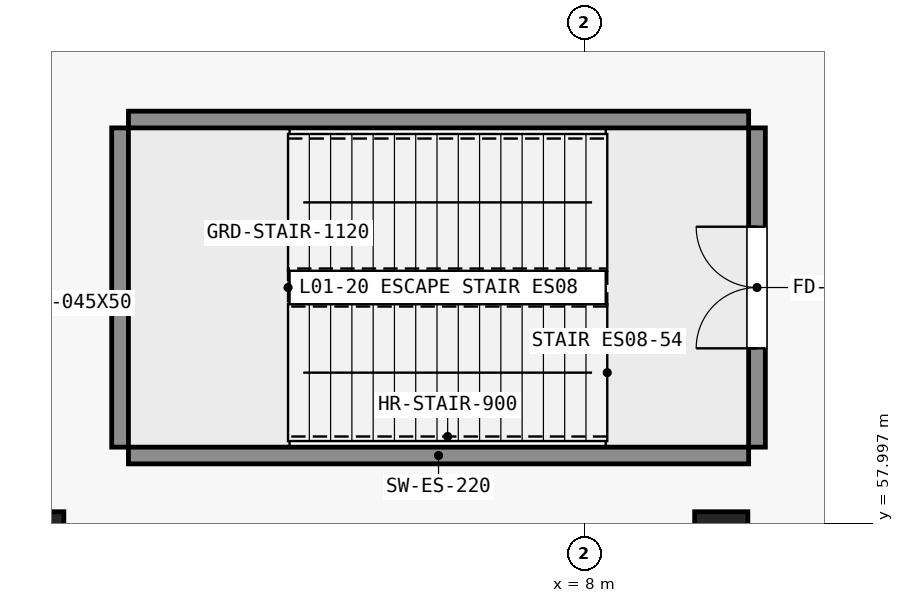
"""IFC4 building model, lengths in metres.
Left out: names, types, materials, properties, quantities, classifications, styles, units other than length and angle.
Written with IfcOpenShell. Run it as: python <this file> out.ifc"""

import sys

from ifc_helpers import new_model, si_unit, direction, frame, frame_2d, origin, origin_2d, place, context, subcontext, project, spatial, rectangle, extrude, element, fill, save


model = new_model("IFC4")
c1 = context("Model", 3, precision=1e-05, world=origin(), true_north=direction((0.0, 1.0)))
c2 = subcontext(c1, "Body", "Model", "MODEL_VIEW")
j1 = project(units=[si_unit("LENGTHUNIT", "METRE"), si_unit("PLANEANGLEUNIT", "RADIAN")], contexts=[c1])
p1 = place(None, origin())
s1 = spatial("IfcSite", under=j1, at=p1, CompositionType="ELEMENT")
p2 = place(p1, origin())
s2 = spatial("IfcBuilding", under=s1, at=p2, CompositionType="ELEMENT")
p3 = place(p2, frame((0.0, 0.0, 6.0)))
s3 = spatial("IfcBuildingStorey", under=s2, at=p3, CompositionType="ELEMENT", Elevation=6.0)
for number, where, z_axis, x_axis in (
    (1, (0.8, 57.8, 0.0), (0.0, 0.0, 1.0), (1.0, 0.0, 0.0)),
    (2, (9.8, 57.8, 0.0), (0.0, 0.0, 1.0), (1.0, 0.0, 0.0)),
):
    element("IfcColumn", number, at=place(p3, frame(where, z_axis=z_axis, x_axis=x_axis)), inside=s3, PredefinedType="COLUMN", context=c2, shape_type="SweptSolid", body=[
        extrude(rectangle(XDim=0.7, YDim=0.7, at=origin_2d()), origin(), (0.0, 0.0, 1.0), 5.4),
    ])
for number, where, z_axis, x_axis in (
    (3, (2.0, 58.89, 0.0), (0.0, 0.0, 1.0), (1.0, 0.0, 0.0)),
    (4, (2.0, 63.31, 0.0), (0.0, 0.0, 1.0), (1.0, 0.0, 0.0)),
):
    element("IfcWall", number, at=place(p3, frame(where, z_axis=z_axis, x_axis=x_axis)), inside=s3, PredefinedType="SHEAR", context=c2, shape_type="SweptSolid", body=[
        extrude(rectangle(XDim=8.16, YDim=0.22, at=frame_2d((4.08, 0.0))), origin(), (0.0, 0.0, 1.0), 5.4),
    ])
p4 = place(p3, frame((1.89, 59.0, 0.0), z_axis=(0.0, 0.0, 1.0), x_axis=(0.0, 1.0, 0.0)))
e5 = element("IfcWall", 5, at=p4, inside=s3, PredefinedType="SHEAR", context=c2, shape_type="SweptSolid", body=[
    extrude(rectangle(XDim=4.2, YDim=0.22, at=frame_2d((2.1, 0.0))), origin(), (0.0, 0.0, 1.0), 5.4),
])
p5 = place(p3, frame((10.27, 59.0, 0.0), z_axis=(0.0, 0.0, 1.0), x_axis=(0.0, 1.0, 0.0)))
e6 = element("IfcWall", 6, at=p5, inside=s3, PredefinedType="SHEAR", context=c2, shape_type="SweptSolid", body=[
    extrude(rectangle(XDim=4.2, YDim=0.22, at=frame_2d((2.1, 0.0))), origin(), (0.0, 0.0, 1.0), 5.4),
])
p6 = place(p5, frame((1.3, 0.0, 0.0)))
e7 = element("IfcOpeningElement", 7, at=p6, cuts=e6, PredefinedType="OPENING", context=c2, shape_type="SweptSolid", body=[
    extrude(rectangle(XDim=1.6, YDim=2.2, at=frame_2d((0.8, 1.1))), frame((0.0, 0.12, 0.0), z_axis=(0.0, -1.0, 0.0), x_axis=(1.0, 0.0, 0.0)), (0.0, 0.0, 1.0), 0.24),
])
p7 = place(p6, origin())
e8 = element("IfcDoor", 8, at=p7, inside=s3, OperationType="DOUBLE_DOOR_SINGLE_SWING", PredefinedType="DOOR", context=c2, shape_type="SweptSolid", body=[
    extrude(rectangle(XDim=1.6, YDim=2.2, at=frame_2d((0.8, 1.1))), frame((0.0, 0.025, 0.0), z_axis=(0.0, -1.0, 0.0), x_axis=(1.0, 0.0, 0.0)), (0.0, 0.0, 1.0), 0.05),
])
fill(e7, e8)
save(model, sys.argv[1])
